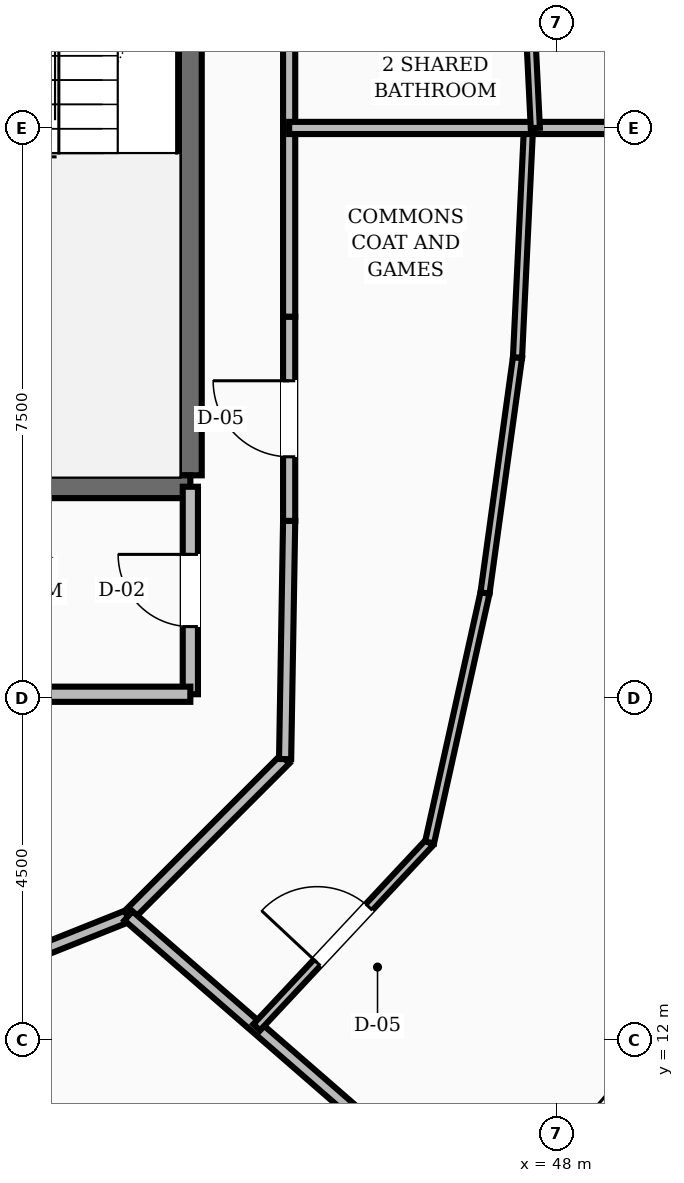
"""IFC4 building model, lengths in metres.
Left out: names, types, materials, properties, quantities, classifications, styles, units other than length and angle.
Written with IfcOpenShell. Run it as: python <this file> out.ifc"""

import sys

from ifc_helpers import new_model, si_unit, direction, frame, frame_2d, origin, place, context, subcontext, project, spatial, rectangle, extrude, element, fill, save


model = new_model("IFC4")
c1 = context("Model", 3, precision=1e-05, world=origin(), true_north=direction((0.0, 1.0)))
c2 = subcontext(c1, "Body", "Model", "MODEL_VIEW")
j1 = project(units=[si_unit("LENGTHUNIT", "METRE"), si_unit("PLANEANGLEUNIT", "RADIAN")], contexts=[c1])
p1 = place(None, origin())
s1 = spatial("IfcSite", under=j1, at=p1, CompositionType="ELEMENT")
p2 = place(p1, origin())
s2 = spatial("IfcBuilding", under=s1, at=p2, CompositionType="ELEMENT")
p3 = place(p2, frame((0.0, 0.0, 236.4)))
s3 = spatial("IfcBuildingStorey", under=s2, at=p3, CompositionType="ELEMENT", Elevation=236.4)
p4 = place(p3, frame((43.18, 19.43, 0.0), z_axis=(0.0, 0.0, 1.0), x_axis=(0.0, 1.0, 0.0)))
e1 = element("IfcWall", 1, at=p4, inside=s3, PredefinedType="SHEAR", context=c2, shape_type="SweptSolid", body=[
    extrude(rectangle(XDim=8.74, YDim=0.3, at=frame_2d((4.37, 0.0))), origin(), (0.0, 0.0, 1.0), 3.6),
])
p5 = place(p3, frame((39.58, 19.28, 0.0), z_axis=(0.0, 0.0, 1.0), x_axis=(1.0, 0.0, 0.0)))
e2 = element("IfcWall", 2, at=p5, inside=s3, PredefinedType="SHEAR", context=c2, shape_type="SweptSolid", body=[
    extrude(rectangle(XDim=3.6, YDim=0.3, at=frame_2d((1.8, 0.0))), origin(), (0.0, 0.0, 1.0), 3.6),
])
p6 = place(p3, frame((43.18, 16.55, 0.0), z_axis=(0.0, 0.0, 1.0), x_axis=(0.0, 1.0, 0.0)))
e3 = element("IfcWall", 3, at=p6, inside=s3, PredefinedType="SOLIDWALL", context=c2, shape_type="SweptSolid", body=[
    extrude(rectangle(XDim=2.73, YDim=0.2, at=frame_2d((1.365, 0.0))), origin(), (0.0, 0.0, 1.0), 2.87),
])
p7 = place(p6, frame((0.89, 0.0, 0.0)))
e4 = element("IfcOpeningElement", 4, at=p7, cuts=e3, PredefinedType="OPENING", context=c2, shape_type="SweptSolid", body=[
    extrude(rectangle(XDim=0.95, YDim=2.1, at=frame_2d((0.475, 1.05))), frame((0.0, 0.11, 0.0), z_axis=(0.0, -1.0, 0.0), x_axis=(1.0, 0.0, 0.0)), (0.0, 0.0, 1.0), 0.22),
])
p8 = place(p3, frame((39.2, 16.55, 0.0), z_axis=(0.0, 0.0, 1.0), x_axis=(1.0, 0.0, 0.0)))
e5 = element("IfcWall", 5, at=p8, inside=s3, PredefinedType="SOLIDWALL", context=c2, shape_type="SweptSolid", body=[
    extrude(rectangle(XDim=3.98, YDim=0.2, at=frame_2d((1.99, 0.0))), origin(), (0.0, 0.0, 1.0), 2.87),
])
p9 = place(p3, frame((44.48, 24.0, 0.0), z_axis=(0.0, 0.0, 1.0), x_axis=(0.0, 1.0, 0.0)))
e6 = element("IfcWall", 6, at=p9, inside=s3, PredefinedType="SOLIDWALL", context=c2, shape_type="SweptSolid", body=[
    extrude(rectangle(XDim=2.482, YDim=0.16, at=frame_2d((1.241, 0.0))), origin(), (0.0, 0.0, 1.0), 2.87),
])
p10 = place(p3, frame((39.651, 12.55, 0.0), z_axis=(0.0, 0.0, 1.0), x_axis=(0.92856882165, 0.371160266542, 0.0)))
e7 = element("IfcWall", 7, at=p10, inside=s3, PredefinedType="SOLIDWALL", context=c2, shape_type="SweptSolid", body=[
    extrude(rectangle(XDim=2.923, YDim=0.16, at=frame_2d((1.461, 0.0))), origin(), (0.0, 0.0, 1.0), 2.87),
])
p11 = place(p3, frame((42.365, 13.635, 0.0), z_axis=(0.0, 0.0, 1.0), x_axis=(0.707106781187, 0.707106781187, 0.0)))
e8 = element("IfcWall", 8, at=p11, inside=s3, PredefinedType="SOLIDWALL", context=c2, shape_type="SweptSolid", body=[
    extrude(rectangle(XDim=2.916, YDim=0.16, at=frame_2d((1.458, 0.0))), origin(), (0.0, 0.0, 1.0), 2.87),
])
p12 = place(p3, frame((44.427, 15.697, 0.0), z_axis=(0.0, 0.0, 1.0), x_axis=(0.016981035134, 0.999855811828, 0.0)))
e9 = element("IfcWall", 9, at=p12, inside=s3, PredefinedType="SOLIDWALL", context=c2, shape_type="SweptSolid", body=[
    extrude(rectangle(XDim=3.134, YDim=0.16, at=frame_2d((1.567, 0.0))), origin(), (0.0, 0.0, 1.0), 2.87),
])
p13 = place(p3, frame((44.48, 18.831, 0.0), z_axis=(0.0, 0.0, 1.0), x_axis=(0.0, 1.0, 0.0)))
e10 = element("IfcWall", 10, at=p13, inside=s3, PredefinedType="SOLIDWALL", context=c2, shape_type="SweptSolid", body=[
    extrude(rectangle(XDim=2.687, YDim=0.16, at=frame_2d((1.344, 0.0))), origin(), (0.0, 0.0, 1.0), 2.87),
])
p14 = place(p13, frame((0.844, 0.0, 0.0)))
e11 = element("IfcOpeningElement", 11, at=p14, cuts=e10, PredefinedType="OPENING", context=c2, shape_type="SweptSolid", body=[
    extrude(rectangle(XDim=1.0, YDim=2.1, at=frame_2d((0.5, 1.05))), frame((0.0, 0.09, 0.0), z_axis=(0.0, -1.0, 0.0), x_axis=(1.0, 0.0, 0.0)), (0.0, 0.0, 1.0), 0.18),
])
p15 = place(p3, frame((44.48, 21.518, 0.0), z_axis=(0.0, 0.0, 1.0), x_axis=(0.0, 1.0, 0.0)))
e12 = element("IfcWall", 12, at=p15, inside=s3, PredefinedType="SOLIDWALL", context=c2, shape_type="SweptSolid", body=[
    extrude(rectangle(XDim=2.482, YDim=0.16, at=frame_2d((1.241, 0.0))), origin(), (0.0, 0.0, 1.0), 2.87),
])
p16 = place(p3, frame((42.365, 13.635, 0.0), z_axis=(0.0, 0.0, 1.0), x_axis=(0.75465361638, -0.656123402482, 0.0)))
e13 = element("IfcWall", 13, at=p16, inside=s3, PredefinedType="SOLIDWALL", context=c2, shape_type="SweptSolid", body=[
    extrude(rectangle(XDim=6.338, YDim=0.16, at=frame_2d((3.169, 0.0))), origin(), (0.0, 0.0, 1.0), 2.87),
])
p17 = place(p3, frame((44.052, 12.168, 0.0), z_axis=(0.0, 0.0, 1.0), x_axis=(0.683143255068, 0.730284391901, 0.0)))
e14 = element("IfcWall", 14, at=p17, inside=s3, PredefinedType="PARTITIONING", context=c2, shape_type="SweptSolid", body=[
    extrude(rectangle(XDim=3.33, YDim=0.12, at=frame_2d((1.665, 0.0))), origin(), (0.0, 0.0, 1.0), 2.87),
])
p18 = place(p17, frame((1.165, 0.0, 0.0)))
e15 = element("IfcOpeningElement", 15, at=p18, cuts=e14, PredefinedType="OPENING", context=c2, shape_type="SweptSolid", body=[
    extrude(rectangle(XDim=1.0, YDim=2.1, at=frame_2d((0.5, 1.05))), frame((0.0, 0.07, 0.0), z_axis=(0.0, -1.0, 0.0), x_axis=(1.0, 0.0, 0.0)), (0.0, 0.0, 1.0), 0.14),
])
p19 = place(p3, frame((46.327, 14.6, 0.0), z_axis=(0.0, 0.0, 1.0), x_axis=(0.216792083166, 0.976217799815, 0.0)))
e16 = element("IfcWall", 16, at=p19, inside=s3, PredefinedType="PARTITIONING", context=c2, shape_type="SweptSolid", body=[
    extrude(rectangle(XDim=3.363, YDim=0.12, at=frame_2d((1.681, 0.0))), origin(), (0.0, 0.0, 1.0), 2.87),
])
p20 = place(p3, frame((47.056, 17.883, 0.0), z_axis=(0.0, 0.0, 1.0), x_axis=(0.136840789859, 0.990593053797, 0.0)))
e17 = element("IfcWall", 17, at=p20, inside=s3, PredefinedType="PARTITIONING", context=c2, shape_type="SweptSolid", body=[
    extrude(rectangle(XDim=3.128, YDim=0.12, at=frame_2d((1.564, 0.0))), origin(), (0.0, 0.0, 1.0), 2.87),
])
p21 = place(p3, frame((47.484, 20.981, 0.0), z_axis=(0.0, 0.0, 1.0), x_axis=(0.047733994434, 0.998860083183, 0.0)))
e18 = element("IfcWall", 18, at=p21, inside=s3, PredefinedType="PARTITIONING", context=c2, shape_type="SweptSolid", body=[
    extrude(rectangle(XDim=3.023, YDim=0.12, at=frame_2d((1.511, 0.0))), origin(), (0.0, 0.0, 1.0), 2.87),
])
p22 = place(p3, frame((44.48, 24.0, 0.0), z_axis=(0.0, 0.0, 1.0), x_axis=(1.0, 0.0, 0.0)))
e19 = element("IfcWall", 19, at=p22, inside=s3, PredefinedType="SOLIDWALL", context=c2, shape_type="SweptSolid", body=[
    extrude(rectangle(XDim=8.946, YDim=0.16, at=frame_2d((4.473, 0.0))), origin(), (0.0, 0.0, 1.0), 2.87),
])
p23 = place(p3, frame((47.719, 24.0, 0.0), z_axis=(0.0, 0.0, 1.0), x_axis=(-0.048939597686, 0.998801739976, 0.0)))
e20 = element("IfcWall", 20, at=p23, inside=s3, PredefinedType="PARTITIONING", context=c2, shape_type="SweptSolid", body=[
    extrude(rectangle(XDim=3.038, YDim=0.12, at=frame_2d((1.519, 0.0))), origin(), (0.0, 0.0, 1.0), 2.87),
])
p24 = place(p3, frame((49.248, 24.0, 0.0), z_axis=(0.0, 0.0, 1.0), x_axis=(-0.130067703559, 0.991505114707, 0.0)))
e21 = element("IfcWall", 21, at=p24, inside=s3, PredefinedType="PARTITIONING", context=c2, shape_type="SweptSolid", body=[
    extrude(rectangle(XDim=6.662, YDim=0.12, at=frame_2d((3.331, 0.0))), origin(), (0.0, 0.0, 1.0), 2.87),
])
p25 = place(p24, frame((3.919, 0.0, 0.0)))
e22 = element("IfcOpeningElement", 22, at=p25, cuts=e21, PredefinedType="OPENING", context=c2, shape_type="SweptSolid", body=[
    extrude(rectangle(XDim=0.95, YDim=2.1, at=frame_2d((0.475, 1.05))), frame((0.0, 0.07, 0.0), z_axis=(0.0, -1.0, 0.0), x_axis=(1.0, 0.0, 0.0)), (0.0, 0.0, 1.0), 0.14),
])
p26 = place(p7, origin())
e23 = element("IfcDoor", 23, at=p26, inside=s3, OperationType="SINGLE_SWING_RIGHT", PredefinedType="DOOR", context=c2, shape_type="SweptSolid", body=[
    extrude(rectangle(XDim=0.95, YDim=2.1, at=frame_2d((0.475, 1.05))), frame((0.0, 0.025, 0.0), z_axis=(0.0, -1.0, 0.0), x_axis=(1.0, 0.0, 0.0)), (0.0, 0.0, 1.0), 0.05),
])
fill(e4, e23)
p27 = place(p14, origin())
e24 = element("IfcDoor", 24, at=p27, inside=s3, OperationType="SINGLE_SWING_RIGHT", PredefinedType="DOOR", context=c2, shape_type="SweptSolid", body=[
    extrude(rectangle(XDim=1.0, YDim=2.1, at=frame_2d((0.5, 1.05))), frame((0.0, 0.025, 0.0), z_axis=(0.0, -1.0, 0.0), x_axis=(1.0, 0.0, 0.0)), (0.0, 0.0, 1.0), 0.05),
])
fill(e11, e24)
p28 = place(p18, origin())
e25 = element("IfcDoor", 25, at=p28, inside=s3, OperationType="SINGLE_SWING_LEFT", PredefinedType="DOOR", context=c2, shape_type="SweptSolid", body=[
    extrude(rectangle(XDim=1.0, YDim=2.1, at=frame_2d((0.5, 1.05))), frame((0.0, 0.025, 0.0), z_axis=(0.0, -1.0, 0.0), x_axis=(1.0, 0.0, 0.0)), (0.0, 0.0, 1.0), 0.05),
])
fill(e15, e25)
save(model, sys.argv[1])
